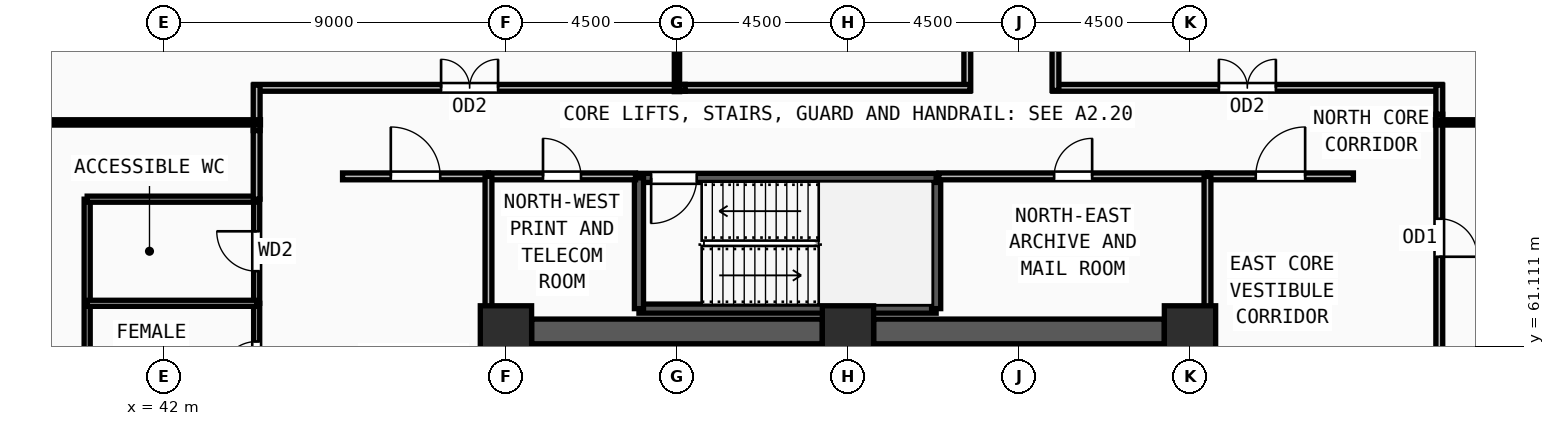
"""IFC4 building model, lengths in metres.
Left out: names, types, materials, properties, quantities, classifications, styles, units other than length and angle.
Written with IfcOpenShell. Run it as: python <this file> out.ifc"""

import sys

from ifc_helpers import new_model, si_unit, direction, frame, frame_2d, origin, origin_2d, place, context, subcontext, project, spatial, rectangle, extrude, source, transform, mapped, element, fill, save


model = new_model("IFC4")
c1 = context("Model", 3, precision=1e-05, world=origin(), true_north=direction((0.0, 1.0)))
c2 = subcontext(c1, "Body", "Model", "MODEL_VIEW")
j1 = project(units=[si_unit("LENGTHUNIT", "METRE"), si_unit("PLANEANGLEUNIT", "RADIAN")], contexts=[c1])
p1 = place(None, origin())
s1 = spatial("IfcSite", under=j1, at=p1, CompositionType="ELEMENT")
p2 = place(p1, origin())
s2 = spatial("IfcBuilding", under=s1, at=p2, CompositionType="ELEMENT")
p3 = place(p2, frame((0.0, 0.0, 236.25)))
s3 = spatial("IfcBuildingStorey", under=s2, at=p3, CompositionType="ELEMENT", Elevation=236.25)
m1 = source(origin(), c2, "Body", "SweptSolid", [
    extrude(rectangle(XDim=1.35, YDim=1.35, at=origin_2d()), origin(), (0.0, 0.0, 1.0), 3.75),
])
for number, where, z_axis, x_axis in (
    (1, (69.0, 61.5, 0.0), (0.0, 0.0, 1.0), (1.0, 0.0, 0.0)),
    (2, (60.0, 61.5, 0.0), (0.0, 0.0, 1.0), (1.0, 0.0, 0.0)),
    (3, (51.0, 61.5, 0.0), (0.0, 0.0, 1.0), (1.0, 0.0, 0.0)),
):
    element("IfcColumn", number, at=place(p3, frame(where, z_axis=z_axis, x_axis=x_axis)), inside=s3, PredefinedType="COLUMN", context=c2, shape_type="MappedRepresentation", body=[
        mapped(m1, transform((0.0, 0.0, 0.0), x_axis=(1.0, 0.0, 0.0), y_axis=(0.0, 1.0, 0.0), z_axis=(0.0, 0.0, 1.0), scale=1.0)),
    ])
for number, where, z_axis, x_axis in (
    (4, (51.675, 61.5, 0.0), (0.0, 0.0, 1.0), (1.0, 0.0, 0.0)),
    (5, (60.675, 61.5, 0.0), (0.0, 0.0, 1.0), (1.0, 0.0, 0.0)),
):
    element("IfcWall", number, at=place(p3, frame(where, z_axis=z_axis, x_axis=x_axis)), inside=s3, PredefinedType="SHEAR", context=c2, shape_type="SweptSolid", body=[
        extrude(rectangle(XDim=7.65, YDim=0.65, at=frame_2d((3.825, 0.0))), origin(), (0.0, 0.0, 1.0), 3.57),
    ])
p4 = place(p3, frame((54.5, 62.1, 0.0), z_axis=(0.0, 0.0, 1.0), x_axis=(1.0, 0.0, 0.0)))
e6 = element("IfcWall", 6, at=p4, inside=s3, PredefinedType="SOLIDWALL", context=c2, shape_type="SweptSolid", body=[
    extrude(rectangle(XDim=7.82, YDim=0.24, at=frame_2d((3.91, 0.0))), origin(), (0.0, 0.0, 1.0), 3.57),
])
p5 = place(p3, frame((62.32, 62.1, 0.0), z_axis=(0.0, 0.0, 1.0), x_axis=(0.0, 1.0, 0.0)))
e7 = element("IfcWall", 7, at=p5, inside=s3, PredefinedType="SOLIDWALL", context=c2, shape_type="SweptSolid", body=[
    extrude(rectangle(XDim=3.44, YDim=0.24, at=frame_2d((1.72, 0.0))), origin(), (0.0, 0.0, 1.0), 3.57),
])
p6 = place(p3, frame((62.32, 65.54, 0.0), z_axis=(0.0, 0.0, 1.0), x_axis=(-1.0, 0.0, 0.0)))
e8 = element("IfcWall", 8, at=p6, inside=s3, PredefinedType="SOLIDWALL", context=c2, shape_type="SweptSolid", body=[
    extrude(rectangle(XDim=7.82, YDim=0.24, at=frame_2d((3.91, 0.0))), origin(), (0.0, 0.0, 1.0), 3.57),
])
m2 = source(origin(), c2, "Body", "SweptSolid", [
    extrude(rectangle(XDim=1.2, YDim=2.2, at=frame_2d((0.6, 1.1))), frame((0.0, 0.13, 0.0), z_axis=(0.0, -1.0, 0.0), x_axis=(1.0, 0.0, 0.0)), (0.0, 0.0, 1.0), 0.26),
])
p7 = place(p6, frame((6.3, 0.0, 0.0)))
e9 = element("IfcOpeningElement", 9, at=p7, cuts=e8, PredefinedType="OPENING", context=c2, shape_type="MappedRepresentation", body=[
    mapped(m2, transform((0.0, 0.0, 0.0), x_axis=(1.0, 0.0, 0.0), y_axis=(0.0, 1.0, 0.0), z_axis=(0.0, 0.0, 1.0), scale=1.0)),
])
p8 = place(p3, frame((54.5, 65.54, 0.0), z_axis=(0.0, 0.0, 1.0), x_axis=(0.0, -1.0, 0.0)))
e10 = element("IfcWall", 10, at=p8, inside=s3, PredefinedType="SOLIDWALL", context=c2, shape_type="SweptSolid", body=[
    extrude(rectangle(XDim=3.44, YDim=0.24, at=frame_2d((1.72, 0.0))), origin(), (0.0, 0.0, 1.0), 3.57),
])
p9 = place(p3, frame((44.44, 59.28, 0.0), z_axis=(0.0, 0.0, 1.0), x_axis=(0.0, 1.0, 0.0)))
e11 = element("IfcWall", 11, at=p9, inside=s3, PredefinedType="PARTITIONING", context=c2, shape_type="SweptSolid", body=[
    extrude(rectangle(XDim=2.96, YDim=0.16, at=frame_2d((1.48, 0.0))), origin(), (0.0, 0.0, 1.0), 3.57),
])
m3 = source(origin(), c2, "Body", "SweptSolid", [
    extrude(rectangle(XDim=0.95, YDim=2.15, at=frame_2d((0.475, 1.075))), frame((0.0, 0.09, 0.0), z_axis=(0.0, -1.0, 0.0), x_axis=(1.0, 0.0, 0.0)), (0.0, 0.0, 1.0), 0.18),
])
p10 = place(p9, frame((1.005, 0.0, 0.0)))
e12 = element("IfcOpeningElement", 12, at=p10, cuts=e11, PredefinedType="OPENING", context=c2, shape_type="MappedRepresentation", body=[
    mapped(m3, transform((0.0, 0.0, 0.0), x_axis=(1.0, 0.0, 0.0), y_axis=(0.0, 1.0, 0.0), z_axis=(0.0, 0.0, 1.0), scale=1.0)),
])
p11 = place(p3, frame((44.44, 62.24, 0.0), z_axis=(0.0, 0.0, 1.0), x_axis=(0.0, 1.0, 0.0)))
e13 = element("IfcWall", 13, at=p11, inside=s3, PredefinedType="PARTITIONING", context=c2, shape_type="SweptSolid", body=[
    extrude(rectangle(XDim=2.74, YDim=0.16, at=frame_2d((1.37, 0.0))), origin(), (0.0, 0.0, 1.0), 3.57),
])
m4 = source(origin(), c2, "Body", "SweptSolid", [
    extrude(rectangle(XDim=1.05, YDim=2.15, at=frame_2d((0.525, 1.075))), frame((0.0, 0.09, 0.0), z_axis=(0.0, -1.0, 0.0), x_axis=(1.0, 0.0, 0.0)), (0.0, 0.0, 1.0), 0.18),
])
p12 = place(p11, frame((0.845, 0.0, 0.0)))
e14 = element("IfcOpeningElement", 14, at=p12, cuts=e13, PredefinedType="OPENING", context=c2, shape_type="MappedRepresentation", body=[
    mapped(m4, transform((0.0, 0.0, 0.0), x_axis=(1.0, 0.0, 0.0), y_axis=(0.0, 1.0, 0.0), z_axis=(0.0, 0.0, 1.0), scale=1.0)),
])
p13 = place(p3, frame((50.54, 65.58, 0.0), z_axis=(0.0, 0.0, 1.0), x_axis=(1.0, 0.0, 0.0)))
e15 = element("IfcWall", 15, at=p13, inside=s3, PredefinedType="PARTITIONING", context=c2, shape_type="SweptSolid", body=[
    extrude(rectangle(XDim=3.87, YDim=0.18, at=frame_2d((1.935, 0.0))), origin(), (0.0, 0.0, 1.0), 3.57),
])
m5 = source(origin(), c2, "Body", "SweptSolid", [
    extrude(rectangle(XDim=1.0, YDim=2.2, at=frame_2d((0.5, 1.1))), frame((0.0, 0.1, 0.0), z_axis=(0.0, -1.0, 0.0), x_axis=(1.0, 0.0, 0.0)), (0.0, 0.0, 1.0), 0.2),
])
p14 = place(p13, frame((1.435, 0.0, 0.0)))
e16 = element("IfcOpeningElement", 16, at=p14, cuts=e15, PredefinedType="OPENING", context=c2, shape_type="MappedRepresentation", body=[
    mapped(m5, transform((0.0, 0.0, 0.0), x_axis=(1.0, 0.0, 0.0), y_axis=(0.0, 1.0, 0.0), z_axis=(0.0, 0.0, 1.0), scale=1.0)),
])
p15 = place(p3, frame((62.39, 65.58, 0.0), z_axis=(0.0, 0.0, 1.0), x_axis=(1.0, 0.0, 0.0)))
e17 = element("IfcWall", 17, at=p15, inside=s3, PredefinedType="PARTITIONING", context=c2, shape_type="SweptSolid", body=[
    extrude(rectangle(XDim=7.07, YDim=0.18, at=frame_2d((3.535, 0.0))), origin(), (0.0, 0.0, 1.0), 3.57),
])
p16 = place(p15, frame((3.035, 0.0, 0.0)))
e18 = element("IfcOpeningElement", 18, at=p16, cuts=e17, PredefinedType="OPENING", context=c2, shape_type="MappedRepresentation", body=[
    mapped(m5, transform((0.0, 0.0, 0.0), x_axis=(1.0, 0.0, 0.0), y_axis=(0.0, 1.0, 0.0), z_axis=(0.0, 0.0, 1.0), scale=1.0)),
])
p17 = place(p3, frame((46.7, 65.58, 0.0), z_axis=(0.0, 0.0, 1.0), x_axis=(1.0, 0.0, 0.0)))
e19 = element("IfcWall", 19, at=p17, inside=s3, PredefinedType="PARTITIONING", context=c2, shape_type="SweptSolid", body=[
    extrude(rectangle(XDim=3.84, YDim=0.18, at=frame_2d((1.92, 0.0))), origin(), (0.0, 0.0, 1.0), 3.57),
])
m6 = source(origin(), c2, "Body", "SweptSolid", [
    extrude(rectangle(XDim=1.3, YDim=2.2, at=frame_2d((0.65, 1.1))), frame((0.0, 0.1, 0.0), z_axis=(0.0, -1.0, 0.0), x_axis=(1.0, 0.0, 0.0)), (0.0, 0.0, 1.0), 0.2),
])
p18 = place(p17, frame((1.27, 0.0, 0.0)))
e20 = element("IfcOpeningElement", 20, at=p18, cuts=e19, PredefinedType="OPENING", context=c2, shape_type="MappedRepresentation", body=[
    mapped(m6, transform((0.0, 0.0, 0.0), x_axis=(1.0, 0.0, 0.0), y_axis=(0.0, 1.0, 0.0), z_axis=(0.0, 0.0, 1.0), scale=1.0)),
])
p19 = place(p3, frame((69.46, 65.58, 0.0), z_axis=(0.0, 0.0, 1.0), x_axis=(1.0, 0.0, 0.0)))
e21 = element("IfcWall", 21, at=p19, inside=s3, PredefinedType="PARTITIONING", context=c2, shape_type="SweptSolid", body=[
    extrude(rectangle(XDim=3.84, YDim=0.18, at=frame_2d((1.92, 0.0))), origin(), (0.0, 0.0, 1.0), 3.57),
])
p20 = place(p19, frame((1.27, 0.0, 0.0)))
e22 = element("IfcOpeningElement", 22, at=p20, cuts=e21, PredefinedType="OPENING", context=c2, shape_type="MappedRepresentation", body=[
    mapped(m6, transform((0.0, 0.0, 0.0), x_axis=(1.0, 0.0, 0.0), y_axis=(0.0, 1.0, 0.0), z_axis=(0.0, 0.0, 1.0), scale=1.0)),
])
p21 = place(p3, frame((75.56, 67.215, 0.0), z_axis=(0.0, 0.0, 1.0), x_axis=(0.0, -1.0, 0.0)))
e23 = element("IfcWall", 23, at=p21, inside=s3, PredefinedType="PARTITIONING", context=c2, shape_type="SweptSolid", body=[
    extrude(rectangle(XDim=6.5, YDim=0.18, at=frame_2d((3.25, 0.0))), origin(), (0.0, 0.0, 1.0), 3.57),
])
p22 = place(p21, frame((2.75, 0.0, 0.0)))
e24 = element("IfcOpeningElement", 24, at=p22, cuts=e23, PredefinedType="OPENING", context=c2, shape_type="MappedRepresentation", body=[
    mapped(m5, transform((0.0, 0.0, 0.0), x_axis=(1.0, 0.0, 0.0), y_axis=(0.0, 1.0, 0.0), z_axis=(0.0, 0.0, 1.0), scale=1.0)),
])
p23 = place(p3, frame((65.39, 67.91, 0.0), z_axis=(0.0, 0.0, 1.0), x_axis=(1.0, 0.0, 0.0)))
e25 = element("IfcWall", 25, at=p23, inside=s3, PredefinedType="PARTITIONING", context=c2, shape_type="SweptSolid", body=[
    extrude(rectangle(XDim=10.24, YDim=0.18, at=frame_2d((5.12, 0.0))), origin(), (0.0, 0.0, 1.0), 3.205),
])
m7 = source(origin(), c2, "Body", "SweptSolid", [
    extrude(rectangle(XDim=1.5, YDim=2.2, at=frame_2d((0.75, 1.1))), frame((0.0, 0.1, 0.0), z_axis=(0.0, -1.0, 0.0), x_axis=(1.0, 0.0, 0.0)), (0.0, 0.0, 1.0), 0.2),
])
p24 = place(p23, frame((4.37, 0.0, 0.0)))
e26 = element("IfcOpeningElement", 26, at=p24, cuts=e25, PredefinedType="OPENING", context=c2, shape_type="MappedRepresentation", body=[
    mapped(m7, transform((0.0, 0.0, 0.0), x_axis=(1.0, 0.0, 0.0), y_axis=(0.0, 1.0, 0.0), z_axis=(0.0, 0.0, 1.0), scale=1.0)),
])
p25 = place(p3, frame((63.14, 67.84, 0.0), z_axis=(0.0, 0.0, 1.0), x_axis=(0.0, 1.0, 0.0)))
e27 = element("IfcWall", 27, at=p25, inside=s3, PredefinedType="PARTITIONING", context=c2, shape_type="SweptSolid", body=[
    extrude(rectangle(XDim=10.272, YDim=0.18, at=frame_2d((5.136, 0.0))), origin(), (0.0, 0.0, 1.0), 3.57),
])
p26 = place(p25, frame((4.636, 0.0, 0.0)))
e28 = element("IfcOpeningElement", 28, at=p26, cuts=e27, PredefinedType="OPENING", context=c2, shape_type="MappedRepresentation", body=[
    mapped(m5, transform((0.0, 0.0, 0.0), x_axis=(1.0, 0.0, 0.0), y_axis=(0.0, 1.0, 0.0), z_axis=(0.0, 0.0, 1.0), scale=1.0)),
])
p27 = place(p3, frame((44.37, 67.91, 0.0), z_axis=(0.0, 0.0, 1.0), x_axis=(1.0, 0.0, 0.0)))
e29 = element("IfcWall", 29, at=p27, inside=s3, PredefinedType="PARTITIONING", context=c2, shape_type="SweptSolid", body=[
    extrude(rectangle(XDim=11.345, YDim=0.18, at=frame_2d((5.672, 0.0))), origin(), (0.0, 0.0, 1.0), 3.205),
])
p28 = place(p27, frame((4.923, 0.0, 0.0)))
e30 = element("IfcOpeningElement", 30, at=p28, cuts=e29, PredefinedType="OPENING", context=c2, shape_type="MappedRepresentation", body=[
    mapped(m7, transform((0.0, 0.0, 0.0), x_axis=(1.0, 0.0, 0.0), y_axis=(0.0, 1.0, 0.0), z_axis=(0.0, 0.0, 1.0), scale=1.0)),
])
p29 = place(p3, frame((39.98, 56.34, 0.0), z_axis=(0.0, 0.0, 1.0), x_axis=(0.0, 1.0, 0.0)))
e31 = element("IfcWall", 31, at=p29, inside=s3, PredefinedType="PARTITIONING", context=c2, shape_type="SweptSolid", body=[
    extrude(rectangle(XDim=8.64, YDim=0.16, at=frame_2d((4.32, 0.0))), origin(), (0.0, 0.0, 1.0), 3.57),
])
for number, where, z_axis, x_axis in (
    (32, (39.98, 62.24, 0.0), (0.0, 0.0, 1.0), (1.0, 0.0, 0.0)),
    (33, (39.98, 64.98, 0.0), (0.0, 0.0, 1.0), (1.0, 0.0, 0.0)),
):
    element("IfcWall", number, at=place(p3, frame(where, z_axis=z_axis, x_axis=x_axis)), inside=s3, PredefinedType="PARTITIONING", context=c2, shape_type="SweptSolid", body=[
        extrude(rectangle(XDim=4.46, YDim=0.16, at=frame_2d((2.23, 0.0))), origin(), (0.0, 0.0, 1.0), 3.57),
    ])
for number, where, z_axis, x_axis in (
    (34, (50.54, 61.95, 0.0), (0.0, 0.0, 1.0), (0.0, 1.0, 0.0)),
    (35, (69.46, 61.95, 0.0), (0.0, 0.0, 1.0), (0.0, 1.0, 0.0)),
):
    element("IfcWall", number, at=place(p3, frame(where, z_axis=z_axis, x_axis=x_axis)), inside=s3, PredefinedType="PARTITIONING", context=c2, shape_type="SweptSolid", body=[
        extrude(rectangle(XDim=3.63, YDim=0.18, at=frame_2d((1.815, 0.0))), origin(), (0.0, 0.0, 1.0), 3.57),
    ])
p30 = place(p3, frame((65.46, 77.935, 0.0), z_axis=(0.0, 0.0, 1.0), x_axis=(0.0, -1.0, 0.0)))
e36 = element("IfcWall", 36, at=p30, inside=s3, PredefinedType="PARTITIONING", context=c2, shape_type="SweptSolid", body=[
    extrude(rectangle(XDim=10.095, YDim=0.18, at=frame_2d((5.047, 0.0))), origin(), (0.0, 0.0, 1.0), 3.57),
])
p31 = place(p3, frame((75.56, 67.98, 0.0), z_axis=(0.0, 0.0, 1.0), x_axis=(0.0, -1.0, 0.0)))
e37 = element("IfcWall", 37, at=p31, inside=s3, PredefinedType="PARTITIONING", context=c2, shape_type="SweptSolid", body=[
    extrude(rectangle(XDim=0.765, YDim=0.18, at=frame_2d((0.382, 0.0))), origin(), (0.0, 0.0, 1.0), 3.57),
])
p32 = place(p3, frame((55.715, 67.91, 0.0), z_axis=(0.0, 0.0, 1.0), x_axis=(1.0, 0.0, 0.0)))
e38 = element("IfcWall", 38, at=p32, inside=s3, PredefinedType="PARTITIONING", context=c2, shape_type="SweptSolid", body=[
    extrude(rectangle(XDim=7.495, YDim=0.18, at=frame_2d((3.748, 0.0))), origin(), (0.0, 0.0, 1.0), 3.57),
])
p33 = place(p3, frame((44.44, 66.785, 0.0), z_axis=(0.0, 0.0, 1.0), x_axis=(0.0, 1.0, 0.0)))
e39 = element("IfcWall", 39, at=p33, inside=s3, PredefinedType="PARTITIONING", context=c2, shape_type="SweptSolid", body=[
    extrude(rectangle(XDim=1.195, YDim=0.18, at=frame_2d((0.598, 0.0))), origin(), (0.0, 0.0, 1.0), 3.57),
])
p34 = place(p3, frame((44.44, 64.98, 0.0), z_axis=(0.0, 0.0, 1.0), x_axis=(0.0, 1.0, 0.0)))
e40 = element("IfcWall", 40, at=p34, inside=s3, PredefinedType="PARTITIONING", context=c2, shape_type="SweptSolid", body=[
    extrude(rectangle(XDim=1.805, YDim=0.18, at=frame_2d((0.902, 0.0))), origin(), (0.0, 0.0, 1.0), 3.57),
])
for number, where, z_axis, x_axis in (
    (41, (44.54, 67.0, 0.0), (0.0, 0.0, 1.0), (-1.0, 0.0, 0.0)),
    (42, (75.46, 67.0, 0.0), (0.0, 0.0, 1.0), (1.0, 0.0, 0.0)),
):
    element("IfcWall", number, at=place(p3, frame(where, z_axis=z_axis, x_axis=x_axis)), inside=s3, PredefinedType="PARTITIONING", context=c2, shape_type="SweptSolid", body=[
        extrude(rectangle(XDim=17.382, YDim=0.14, at=frame_2d((8.691, 0.0))), origin(), (0.0, 0.0, 1.0), 3.57),
    ])
p35 = place(p3, frame((55.5, 67.81, 0.0), z_axis=(0.0, 0.0, 1.0), x_axis=(0.0, 1.0, 0.0)))
e43 = element("IfcWall", 43, at=p35, inside=s3, PredefinedType="PARTITIONING", context=c2, shape_type="SweptSolid", body=[
    extrude(rectangle(XDim=9.996, YDim=0.14, at=frame_2d((4.998, 0.0))), origin(), (0.0, 0.0, 1.0), 3.57),
])
m8 = source(origin(), c2, "Body", "SweptSolid", [
    extrude(rectangle(XDim=1.2, YDim=2.2, at=frame_2d((0.6, 1.1))), frame((0.0, 0.025, 0.0), z_axis=(0.0, -1.0, 0.0), x_axis=(1.0, 0.0, 0.0)), (0.0, 0.0, 1.0), 0.05),
])
p36 = place(p7, origin())
e44 = element("IfcDoor", 44, at=p36, inside=s3, OperationType="SINGLE_SWING_RIGHT", PredefinedType="DOOR", context=c2, shape_type="MappedRepresentation", body=[
    mapped(m8, transform((0.0, 0.0, 0.0), x_axis=(1.0, 0.0, 0.0), y_axis=(0.0, 1.0, 0.0), z_axis=(0.0, 0.0, 1.0), scale=1.0)),
])
fill(e9, e44)
m9 = source(origin(), c2, "Body", "SweptSolid", [
    extrude(rectangle(XDim=0.95, YDim=2.15, at=frame_2d((0.475, 1.075))), frame((0.0, 0.025, 0.0), z_axis=(0.0, -1.0, 0.0), x_axis=(1.0, 0.0, 0.0)), (0.0, 0.0, 1.0), 0.05),
])
p37 = place(p10, origin())
e45 = element("IfcDoor", 45, at=p37, inside=s3, OperationType="SINGLE_SWING_LEFT", PredefinedType="DOOR", context=c2, shape_type="MappedRepresentation", body=[
    mapped(m9, transform((0.0, 0.0, 0.0), x_axis=(1.0, 0.0, 0.0), y_axis=(0.0, 1.0, 0.0), z_axis=(0.0, 0.0, 1.0), scale=1.0)),
])
fill(e12, e45)
m10 = source(origin(), c2, "Body", "SweptSolid", [
    extrude(rectangle(XDim=1.05, YDim=2.15, at=frame_2d((0.525, 1.075))), frame((0.0, 0.025, 0.0), z_axis=(0.0, -1.0, 0.0), x_axis=(1.0, 0.0, 0.0)), (0.0, 0.0, 1.0), 0.05),
])
p38 = place(p12, origin())
e46 = element("IfcDoor", 46, at=p38, inside=s3, OperationType="SINGLE_SWING_RIGHT", PredefinedType="DOOR", context=c2, shape_type="MappedRepresentation", body=[
    mapped(m10, transform((0.0, 0.0, 0.0), x_axis=(1.0, 0.0, 0.0), y_axis=(0.0, 1.0, 0.0), z_axis=(0.0, 0.0, 1.0), scale=1.0)),
])
fill(e14, e46)
m11 = source(origin(), c2, "Body", "SweptSolid", [
    extrude(rectangle(XDim=1.0, YDim=2.2, at=frame_2d((0.5, 1.1))), frame((0.0, 0.025, 0.0), z_axis=(0.0, -1.0, 0.0), x_axis=(1.0, 0.0, 0.0)), (0.0, 0.0, 1.0), 0.05),
])
p39 = place(p14, origin())
e47 = element("IfcDoor", 47, at=p39, inside=s3, OperationType="SINGLE_SWING_LEFT", PredefinedType="DOOR", context=c2, shape_type="MappedRepresentation", body=[
    mapped(m11, transform((0.0, 0.0, 0.0), x_axis=(1.0, 0.0, 0.0), y_axis=(0.0, 1.0, 0.0), z_axis=(0.0, 0.0, 1.0), scale=1.0)),
])
fill(e16, e47)
p40 = place(p16, origin())
e48 = element("IfcDoor", 48, at=p40, inside=s3, OperationType="SINGLE_SWING_RIGHT", PredefinedType="DOOR", context=c2, shape_type="MappedRepresentation", body=[
    mapped(m11, transform((0.0, 0.0, 0.0), x_axis=(1.0, 0.0, 0.0), y_axis=(0.0, 1.0, 0.0), z_axis=(0.0, 0.0, 1.0), scale=1.0)),
])
fill(e18, e48)
m12 = source(origin(), c2, "Body", "SweptSolid", [
    extrude(rectangle(XDim=1.3, YDim=2.2, at=frame_2d((0.65, 1.1))), frame((0.0, 0.025, 0.0), z_axis=(0.0, -1.0, 0.0), x_axis=(1.0, 0.0, 0.0)), (0.0, 0.0, 1.0), 0.05),
])
p41 = place(p18, origin())
e49 = element("IfcDoor", 49, at=p41, inside=s3, OperationType="SINGLE_SWING_LEFT", PredefinedType="DOOR", context=c2, shape_type="MappedRepresentation", body=[
    mapped(m12, transform((0.0, 0.0, 0.0), x_axis=(1.0, 0.0, 0.0), y_axis=(0.0, 1.0, 0.0), z_axis=(0.0, 0.0, 1.0), scale=1.0)),
])
fill(e20, e49)
p42 = place(p20, origin())
e50 = element("IfcDoor", 50, at=p42, inside=s3, OperationType="SINGLE_SWING_RIGHT", PredefinedType="DOOR", context=c2, shape_type="MappedRepresentation", body=[
    mapped(m12, transform((0.0, 0.0, 0.0), x_axis=(1.0, 0.0, 0.0), y_axis=(0.0, 1.0, 0.0), z_axis=(0.0, 0.0, 1.0), scale=1.0)),
])
fill(e22, e50)
p43 = place(p22, origin())
e51 = element("IfcDoor", 51, at=p43, inside=s3, OperationType="SINGLE_SWING_RIGHT", PredefinedType="DOOR", context=c2, shape_type="MappedRepresentation", body=[
    mapped(m11, transform((0.0, 0.0, 0.0), x_axis=(1.0, 0.0, 0.0), y_axis=(0.0, 1.0, 0.0), z_axis=(0.0, 0.0, 1.0), scale=1.0)),
])
fill(e24, e51)
m13 = source(origin(), c2, "Body", "SweptSolid", [
    extrude(rectangle(XDim=1.5, YDim=2.2, at=frame_2d((0.75, 1.1))), frame((0.0, 0.025, 0.0), z_axis=(0.0, -1.0, 0.0), x_axis=(1.0, 0.0, 0.0)), (0.0, 0.0, 1.0), 0.05),
])
p44 = place(p24, origin())
e52 = element("IfcDoor", 52, at=p44, inside=s3, OperationType="DOUBLE_DOOR_SINGLE_SWING", PredefinedType="DOOR", context=c2, shape_type="MappedRepresentation", body=[
    mapped(m13, transform((0.0, 0.0, 0.0), x_axis=(1.0, 0.0, 0.0), y_axis=(0.0, 1.0, 0.0), z_axis=(0.0, 0.0, 1.0), scale=1.0)),
])
fill(e26, e52)
p45 = place(p28, origin())
e53 = element("IfcDoor", 53, at=p45, inside=s3, OperationType="DOUBLE_DOOR_SINGLE_SWING", PredefinedType="DOOR", context=c2, shape_type="MappedRepresentation", body=[
    mapped(m13, transform((0.0, 0.0, 0.0), x_axis=(1.0, 0.0, 0.0), y_axis=(0.0, 1.0, 0.0), z_axis=(0.0, 0.0, 1.0), scale=1.0)),
])
fill(e30, e53)
save(model, sys.argv[1])
